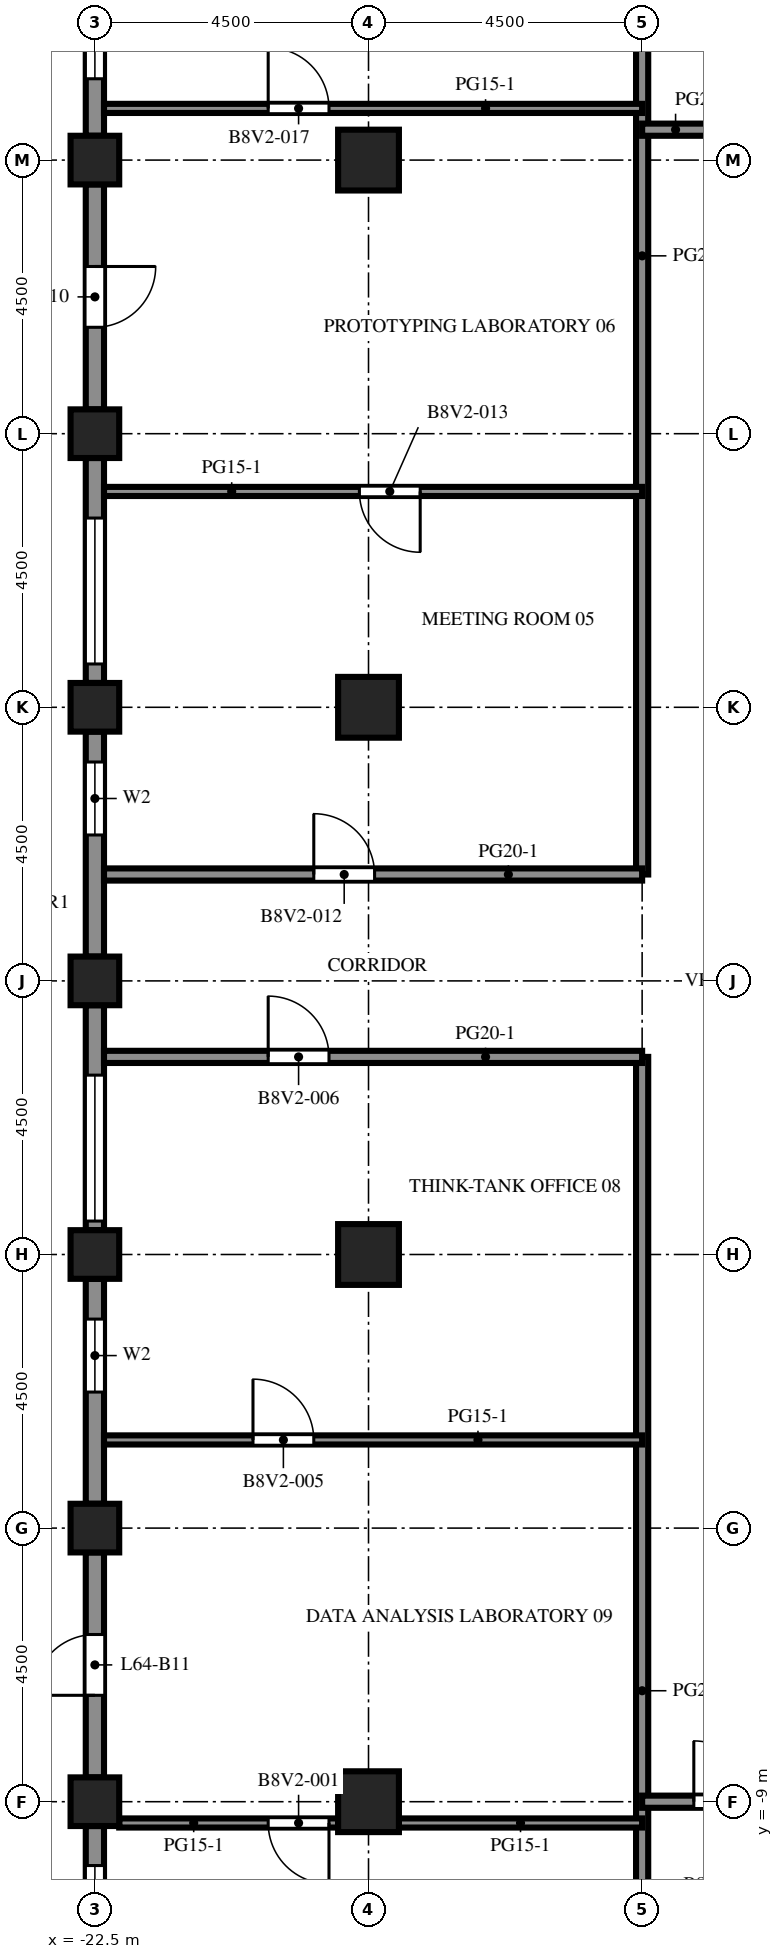
"""IFC4 building model, lengths in metres.
Left out: names, types, materials, properties, quantities, classifications, styles, units other than length and angle.
Written with IfcOpenShell. Run it as: python <this file> out.ifc"""

import sys

from ifc_helpers import new_model, si_unit, direction, frame, frame_2d, origin, origin_2d, place, context, subcontext, project, spatial, rectangle, extrude, element, fill, save


model = new_model("IFC4")
c1 = context("Model", 3, precision=1e-05, world=origin(), true_north=direction((0.0, 1.0)))
c2 = subcontext(c1, "Body", "Model", "MODEL_VIEW")
j1 = project(units=[si_unit("LENGTHUNIT", "METRE"), si_unit("PLANEANGLEUNIT", "RADIAN")], contexts=[c1])
p1 = place(None, origin())
s1 = spatial("IfcSite", under=j1, at=p1, CompositionType="ELEMENT")
p2 = place(p1, origin())
s2 = spatial("IfcBuilding", under=s1, at=p2, CompositionType="ELEMENT")
p3 = place(p2, frame((0.0, 0.0, 282.7)))
s3 = spatial("IfcBuildingStorey", under=s2, at=p3, CompositionType="ELEMENT", Elevation=282.7)
for number, where, z_axis, x_axis in (
    (1, (-22.5, -9.0, 0.0), (0.0, 0.0, 1.0), (1.0, 0.0, 0.0)),
    (2, (-22.5, -4.5, 0.0), (0.0, 0.0, 1.0), (1.0, 0.0, 0.0)),
    (3, (-22.5, 0.0, 0.0), (0.0, 0.0, 1.0), (1.0, 0.0, 0.0)),
    (4, (-22.5, 4.5, 0.0), (0.0, 0.0, 1.0), (1.0, 0.0, 0.0)),
    (5, (-22.5, 9.0, 0.0), (0.0, 0.0, 1.0), (1.0, 0.0, 0.0)),
    (6, (-22.5, 13.5, 0.0), (0.0, 0.0, 1.0), (1.0, 0.0, 0.0)),
    (7, (-22.5, 18.0, 0.0), (0.0, 0.0, 1.0), (1.0, 0.0, 0.0)),
):
    element("IfcColumn", number, at=place(p3, frame(where, z_axis=z_axis, x_axis=x_axis)), inside=s3, PredefinedType="COLUMN", context=c2, shape_type="SweptSolid", body=[
        extrude(rectangle(XDim=0.8, YDim=0.8, at=origin_2d()), origin(), (0.0, 0.0, 1.0), 4.1),
    ])
for number, where, z_axis, x_axis in (
    (8, (-18.0, -9.0, 0.0), (0.0, 0.0, 1.0), (1.0, 0.0, 0.0)),
    (9, (-18.0, 0.0, 0.0), (0.0, 0.0, 1.0), (1.0, 0.0, 0.0)),
    (10, (-18.0, 9.0, 0.0), (0.0, 0.0, 1.0), (1.0, 0.0, 0.0)),
    (11, (-18.0, 18.0, 0.0), (0.0, 0.0, 1.0), (1.0, 0.0, 0.0)),
):
    element("IfcColumn", number, at=place(p3, frame(where, z_axis=z_axis, x_axis=x_axis)), inside=s3, PredefinedType="COLUMN", context=c2, shape_type="SweptSolid", body=[
        extrude(rectangle(XDim=1.0, YDim=1.0, at=origin_2d()), origin(), (0.0, 0.0, 1.0), 4.1),
    ])
p4 = place(p3, frame((-22.5, 18.4, 0.0), z_axis=(0.0, 0.0, 1.0), x_axis=(0.0, 1.0, 0.0)))
e12 = element("IfcWall", 12, at=p4, inside=s3, PredefinedType="SOLIDWALL", context=c2, shape_type="SweptSolid", body=[
    extrude(rectangle(XDim=3.7, YDim=0.3, at=frame_2d((1.85, 0.0))), origin(), (0.0, 0.0, 1.0), 2.85),
])
p5 = place(p4, frame((0.938, 0.0, 0.8)))
e13 = element("IfcOpeningElement", 13, at=p5, cuts=e12, PredefinedType="OPENING", context=c2, shape_type="SweptSolid", body=[
    extrude(rectangle(XDim=2.4, YDim=1.7, at=frame_2d((1.2, 0.85))), frame((0.0, 0.16, 0.0), z_axis=(0.0, -1.0, 0.0), x_axis=(1.0, 0.0, 0.0)), (0.0, 0.0, 1.0), 0.32),
])
p6 = place(p3, frame((-22.5, 13.9, 0.0), z_axis=(0.0, 0.0, 1.0), x_axis=(0.0, 1.0, 0.0)))
e14 = element("IfcWall", 14, at=p6, inside=s3, PredefinedType="SOLIDWALL", context=c2, shape_type="SweptSolid", body=[
    extrude(rectangle(XDim=3.7, YDim=0.3, at=frame_2d((1.85, 0.0))), origin(), (0.0, 0.0, 1.0), 2.85),
])
p7 = place(p6, frame((1.35, 0.0, 0.0)))
e15 = element("IfcOpeningElement", 15, at=p7, cuts=e14, PredefinedType="OPENING", context=c2, shape_type="SweptSolid", body=[
    extrude(rectangle(XDim=1.0, YDim=2.2, at=frame_2d((0.5, 1.1))), frame((0.0, 0.16, 0.0), z_axis=(0.0, -1.0, 0.0), x_axis=(1.0, 0.0, 0.0)), (0.0, 0.0, 1.0), 0.32),
])
p8 = place(p3, frame((-22.5, 9.4, 0.0), z_axis=(0.0, 0.0, 1.0), x_axis=(0.0, 1.0, 0.0)))
e16 = element("IfcWall", 16, at=p8, inside=s3, PredefinedType="SOLIDWALL", context=c2, shape_type="SweptSolid", body=[
    extrude(rectangle(XDim=3.7, YDim=0.3, at=frame_2d((1.85, 0.0))), origin(), (0.0, 0.0, 1.0), 2.85),
])
p9 = place(p8, frame((0.312, 0.0, 0.8)))
e17 = element("IfcOpeningElement", 17, at=p9, cuts=e16, PredefinedType="OPENING", context=c2, shape_type="SweptSolid", body=[
    extrude(rectangle(XDim=2.4, YDim=1.7, at=frame_2d((1.2, 0.85))), frame((0.0, 0.16, 0.0), z_axis=(0.0, -1.0, 0.0), x_axis=(1.0, 0.0, 0.0)), (0.0, 0.0, 1.0), 0.32),
])
p10 = place(p3, frame((-22.5, 4.9, 0.0), z_axis=(0.0, 0.0, 1.0), x_axis=(0.0, 1.0, 0.0)))
e18 = element("IfcWall", 18, at=p10, inside=s3, PredefinedType="SOLIDWALL", context=c2, shape_type="SweptSolid", body=[
    extrude(rectangle(XDim=3.7, YDim=0.3, at=frame_2d((1.85, 0.0))), origin(), (0.0, 0.0, 1.0), 2.85),
])
p11 = place(p10, frame((2.0, 0.0, 0.8)))
e19 = element("IfcOpeningElement", 19, at=p11, cuts=e18, PredefinedType="OPENING", context=c2, shape_type="SweptSolid", body=[
    extrude(rectangle(XDim=1.2, YDim=1.7, at=frame_2d((0.6, 0.85))), frame((0.0, 0.16, 0.0), z_axis=(0.0, -1.0, 0.0), x_axis=(1.0, 0.0, 0.0)), (0.0, 0.0, 1.0), 0.32),
])
p12 = place(p3, frame((-22.5, 0.4, 0.0), z_axis=(0.0, 0.0, 1.0), x_axis=(0.0, 1.0, 0.0)))
e20 = element("IfcWall", 20, at=p12, inside=s3, PredefinedType="SOLIDWALL", context=c2, shape_type="SweptSolid", body=[
    extrude(rectangle(XDim=3.7, YDim=0.3, at=frame_2d((1.85, 0.0))), origin(), (0.0, 0.0, 1.0), 2.85),
])
p13 = place(p12, frame((0.15, 0.0, 0.8)))
e21 = element("IfcOpeningElement", 21, at=p13, cuts=e20, PredefinedType="OPENING", context=c2, shape_type="SweptSolid", body=[
    extrude(rectangle(XDim=2.4, YDim=1.7, at=frame_2d((1.2, 0.85))), frame((0.0, 0.16, 0.0), z_axis=(0.0, -1.0, 0.0), x_axis=(1.0, 0.0, 0.0)), (0.0, 0.0, 1.0), 0.32),
])
p14 = place(p3, frame((-22.5, -4.1, 0.0), z_axis=(0.0, 0.0, 1.0), x_axis=(0.0, 1.0, 0.0)))
e22 = element("IfcWall", 22, at=p14, inside=s3, PredefinedType="SOLIDWALL", context=c2, shape_type="SweptSolid", body=[
    extrude(rectangle(XDim=3.7, YDim=0.3, at=frame_2d((1.85, 0.0))), origin(), (0.0, 0.0, 1.0), 2.85),
])
p15 = place(p14, frame((1.837, 0.0, 0.8)))
e23 = element("IfcOpeningElement", 23, at=p15, cuts=e22, PredefinedType="OPENING", context=c2, shape_type="SweptSolid", body=[
    extrude(rectangle(XDim=1.2, YDim=1.7, at=frame_2d((0.6, 0.85))), frame((0.0, 0.16, 0.0), z_axis=(0.0, -1.0, 0.0), x_axis=(1.0, 0.0, 0.0)), (0.0, 0.0, 1.0), 0.32),
])
p16 = place(p3, frame((-22.5, -8.6, 0.0), z_axis=(0.0, 0.0, 1.0), x_axis=(0.0, 1.0, 0.0)))
e24 = element("IfcWall", 24, at=p16, inside=s3, PredefinedType="SOLIDWALL", context=c2, shape_type="SweptSolid", body=[
    extrude(rectangle(XDim=3.7, YDim=0.3, at=frame_2d((1.85, 0.0))), origin(), (0.0, 0.0, 1.0), 2.85),
])
p17 = place(p16, frame((1.35, 0.0, 0.0)))
e25 = element("IfcOpeningElement", 25, at=p17, cuts=e24, PredefinedType="OPENING", context=c2, shape_type="SweptSolid", body=[
    extrude(rectangle(XDim=1.0, YDim=2.2, at=frame_2d((0.5, 1.1))), frame((0.0, 0.16, 0.0), z_axis=(0.0, -1.0, 0.0), x_axis=(1.0, 0.0, 0.0)), (0.0, 0.0, 1.0), 0.32),
])
p18 = place(p3, frame((-22.5, -13.1, 0.0), z_axis=(0.0, 0.0, 1.0), x_axis=(0.0, 1.0, 0.0)))
e26 = element("IfcWall", 26, at=p18, inside=s3, PredefinedType="SOLIDWALL", context=c2, shape_type="SweptSolid", body=[
    extrude(rectangle(XDim=3.7, YDim=0.3, at=frame_2d((1.85, 0.0))), origin(), (0.0, 0.0, 1.0), 2.85),
])
p19 = place(p18, frame((0.65, 0.0, 0.8)))
e27 = element("IfcOpeningElement", 27, at=p19, cuts=e26, PredefinedType="OPENING", context=c2, shape_type="SweptSolid", body=[
    extrude(rectangle(XDim=2.4, YDim=1.7, at=frame_2d((1.2, 0.85))), frame((0.0, 0.16, 0.0), z_axis=(0.0, -1.0, 0.0), x_axis=(1.0, 0.0, 0.0)), (0.0, 0.0, 1.0), 0.32),
])
p20 = place(p3, frame((-13.5, -17.6, 0.0), z_axis=(0.0, 0.0, 1.0), x_axis=(0.0, 1.0, 0.0)))
e28 = element("IfcWall", 28, at=p20, inside=s3, PredefinedType="PARTITIONING", context=c2, shape_type="SweptSolid", body=[
    extrude(rectangle(XDim=20.85, YDim=0.2, at=frame_2d((10.425, 0.0))), origin(), (0.0, 0.0, 1.0), 3.65),
])
p21 = place(p3, frame((-13.5, 6.25, 0.0), z_axis=(0.0, 0.0, 1.0), x_axis=(0.0, 1.0, 0.0)))
e29 = element("IfcWall", 29, at=p21, inside=s3, PredefinedType="PARTITIONING", context=c2, shape_type="SweptSolid", body=[
    extrude(rectangle(XDim=20.35, YDim=0.2, at=frame_2d((10.175, 0.0))), origin(), (0.0, 0.0, 1.0), 3.65),
])
p22 = place(p3, frame((-18.5, -9.35, 0.0), z_axis=(0.0, 0.0, 1.0), x_axis=(-1.0, 0.0, 0.0)))
e30 = element("IfcWall", 30, at=p22, inside=s3, PredefinedType="PARTITIONING", context=c2, shape_type="SweptSolid", body=[
    extrude(rectangle(XDim=3.6, YDim=0.15, at=frame_2d((1.8, 0.0))), origin(), (0.0, 0.0, 1.0), 3.65),
])
p23 = place(p22, frame((0.15, 0.0, 0.0)))
e31 = element("IfcOpeningElement", 31, at=p23, cuts=e30, PredefinedType="OPENING", context=c2, shape_type="SweptSolid", body=[
    extrude(rectangle(XDim=1.0, YDim=2.1, at=frame_2d((0.5, 1.05))), frame((0.0, 0.085, 0.0), z_axis=(0.0, -1.0, 0.0), x_axis=(1.0, 0.0, 0.0)), (0.0, 0.0, 1.0), 0.17),
])
p24 = place(p3, frame((-17.5, -9.35, 0.0), z_axis=(0.0, 0.0, 1.0), x_axis=(1.0, 0.0, 0.0)))
e32 = element("IfcWall", 32, at=p24, inside=s3, PredefinedType="PARTITIONING", context=c2, shape_type="SweptSolid", body=[
    extrude(rectangle(XDim=4.0, YDim=0.15, at=frame_2d((2.0, 0.0))), origin(), (0.0, 0.0, 1.0), 3.65),
])
p25 = place(p3, frame((-10.5, -9.0, 0.0), z_axis=(0.0, 0.0, 1.0), x_axis=(-1.0, 0.0, 0.0)))
e33 = element("IfcWall", 33, at=p25, inside=s3, PredefinedType="PARTITIONING", context=c2, shape_type="SweptSolid", body=[
    extrude(rectangle(XDim=3.0, YDim=0.2, at=frame_2d((1.5, 0.0))), origin(), (0.0, 0.0, 1.0), 3.65),
])
p26 = place(p25, frame((1.15, 0.0, 0.0)))
e34 = element("IfcOpeningElement", 34, at=p26, cuts=e33, PredefinedType="OPENING", context=c2, shape_type="SweptSolid", body=[
    extrude(rectangle(XDim=1.0, YDim=2.1, at=frame_2d((0.5, 1.05))), frame((0.0, 0.11, 0.0), z_axis=(0.0, -1.0, 0.0), x_axis=(1.0, 0.0, 0.0)), (0.0, 0.0, 1.0), 0.22),
])
p27 = place(p3, frame((-13.5, -3.05, 0.0), z_axis=(0.0, 0.0, 1.0), x_axis=(-1.0, 0.0, 0.0)))
e35 = element("IfcWall", 35, at=p27, inside=s3, PredefinedType="PARTITIONING", context=c2, shape_type="SweptSolid", body=[
    extrude(rectangle(XDim=8.85, YDim=0.15, at=frame_2d((4.425, 0.0))), origin(), (0.0, 0.0, 1.0), 3.65),
])
p28 = place(p27, frame((5.4, 0.0, 0.0)))
e36 = element("IfcOpeningElement", 36, at=p28, cuts=e35, PredefinedType="OPENING", context=c2, shape_type="SweptSolid", body=[
    extrude(rectangle(XDim=1.0, YDim=2.1, at=frame_2d((0.5, 1.05))), frame((0.0, 0.085, 0.0), z_axis=(0.0, -1.0, 0.0), x_axis=(1.0, 0.0, 0.0)), (0.0, 0.0, 1.0), 0.17),
])
p29 = place(p3, frame((-13.5, 3.25, 0.0), z_axis=(0.0, 0.0, 1.0), x_axis=(-1.0, 0.0, 0.0)))
e37 = element("IfcWall", 37, at=p29, inside=s3, PredefinedType="PARTITIONING", context=c2, shape_type="SweptSolid", body=[
    extrude(rectangle(XDim=8.85, YDim=0.2, at=frame_2d((4.425, 0.0))), origin(), (0.0, 0.0, 1.0), 3.65),
])
p30 = place(p29, frame((5.15, 0.0, 0.0)))
e38 = element("IfcOpeningElement", 38, at=p30, cuts=e37, PredefinedType="OPENING", context=c2, shape_type="SweptSolid", body=[
    extrude(rectangle(XDim=1.0, YDim=2.1, at=frame_2d((0.5, 1.05))), frame((0.0, 0.11, 0.0), z_axis=(0.0, -1.0, 0.0), x_axis=(1.0, 0.0, 0.0)), (0.0, 0.0, 1.0), 0.22),
])
p31 = place(p3, frame((-22.35, 6.25, 0.0), z_axis=(0.0, 0.0, 1.0), x_axis=(1.0, 0.0, 0.0)))
e39 = element("IfcWall", 39, at=p31, inside=s3, PredefinedType="PARTITIONING", context=c2, shape_type="SweptSolid", body=[
    extrude(rectangle(XDim=8.85, YDim=0.2, at=frame_2d((4.425, 0.0))), origin(), (0.0, 0.0, 1.0), 3.65),
])
p32 = place(p31, frame((3.45, 0.0, 0.0)))
e40 = element("IfcOpeningElement", 40, at=p32, cuts=e39, PredefinedType="OPENING", context=c2, shape_type="SweptSolid", body=[
    extrude(rectangle(XDim=1.0, YDim=2.1, at=frame_2d((0.5, 1.05))), frame((0.0, 0.11, 0.0), z_axis=(0.0, -1.0, 0.0), x_axis=(1.0, 0.0, 0.0)), (0.0, 0.0, 1.0), 0.22),
])
p33 = place(p3, frame((-22.35, 12.55, 0.0), z_axis=(0.0, 0.0, 1.0), x_axis=(1.0, 0.0, 0.0)))
e41 = element("IfcWall", 41, at=p33, inside=s3, PredefinedType="PARTITIONING", context=c2, shape_type="SweptSolid", body=[
    extrude(rectangle(XDim=8.85, YDim=0.15, at=frame_2d((4.425, 0.0))), origin(), (0.0, 0.0, 1.0), 3.65),
])
p34 = place(p33, frame((4.2, 0.0, 0.0)))
e42 = element("IfcOpeningElement", 42, at=p34, cuts=e41, PredefinedType="OPENING", context=c2, shape_type="SweptSolid", body=[
    extrude(rectangle(XDim=1.0, YDim=2.1, at=frame_2d((0.5, 1.05))), frame((0.0, 0.085, 0.0), z_axis=(0.0, -1.0, 0.0), x_axis=(1.0, 0.0, 0.0)), (0.0, 0.0, 1.0), 0.17),
])
p35 = place(p3, frame((-13.5, 18.5, 0.0), z_axis=(0.0, 0.0, 1.0), x_axis=(1.0, 0.0, 0.0)))
e43 = element("IfcWall", 43, at=p35, inside=s3, PredefinedType="PARTITIONING", context=c2, shape_type="SweptSolid", body=[
    extrude(rectangle(XDim=3.0, YDim=0.2, at=frame_2d((1.5, 0.0))), origin(), (0.0, 0.0, 1.0), 3.65),
])
p36 = place(p35, frame((1.1, 0.0, 0.0)))
e44 = element("IfcOpeningElement", 44, at=p36, cuts=e43, PredefinedType="OPENING", context=c2, shape_type="SweptSolid", body=[
    extrude(rectangle(XDim=1.0, YDim=2.1, at=frame_2d((0.5, 1.05))), frame((0.0, 0.11, 0.0), z_axis=(0.0, -1.0, 0.0), x_axis=(1.0, 0.0, 0.0)), (0.0, 0.0, 1.0), 0.22),
])
p37 = place(p3, frame((-22.35, 18.85, 0.0), z_axis=(0.0, 0.0, 1.0), x_axis=(1.0, 0.0, 0.0)))
e45 = element("IfcWall", 45, at=p37, inside=s3, PredefinedType="PARTITIONING", context=c2, shape_type="SweptSolid", body=[
    extrude(rectangle(XDim=8.85, YDim=0.15, at=frame_2d((4.425, 0.0))), origin(), (0.0, 0.0, 1.0), 3.65),
])
p38 = place(p37, frame((2.7, 0.0, 0.0)))
e46 = element("IfcOpeningElement", 46, at=p38, cuts=e45, PredefinedType="OPENING", context=c2, shape_type="SweptSolid", body=[
    extrude(rectangle(XDim=1.0, YDim=2.1, at=frame_2d((0.5, 1.05))), frame((0.0, 0.085, 0.0), z_axis=(0.0, -1.0, 0.0), x_axis=(1.0, 0.0, 0.0)), (0.0, 0.0, 1.0), 0.17),
])
p39 = place(p5, origin())
e47 = element("IfcWindow", 47, at=p39, inside=s3, PartitioningType="SINGLE_PANEL", PredefinedType="WINDOW", context=c2, shape_type="SweptSolid", body=[
    extrude(rectangle(XDim=2.4, YDim=1.7, at=frame_2d((1.2, 0.85))), frame((0.0, 0.03, 0.0), z_axis=(0.0, -1.0, 0.0), x_axis=(1.0, 0.0, 0.0)), (0.0, 0.0, 1.0), 0.06),
])
fill(e13, e47)
p40 = place(p7, origin())
e48 = element("IfcDoor", 48, at=p40, inside=s3, OperationType="SINGLE_SWING_RIGHT", PredefinedType="DOOR", context=c2, shape_type="SweptSolid", body=[
    extrude(rectangle(XDim=1.0, YDim=2.2, at=frame_2d((0.5, 1.1))), frame((0.0, 0.025, 0.0), z_axis=(0.0, -1.0, 0.0), x_axis=(1.0, 0.0, 0.0)), (0.0, 0.0, 1.0), 0.05),
])
fill(e15, e48)
p41 = place(p9, origin())
e49 = element("IfcWindow", 49, at=p41, inside=s3, PartitioningType="SINGLE_PANEL", PredefinedType="WINDOW", context=c2, shape_type="SweptSolid", body=[
    extrude(rectangle(XDim=2.4, YDim=1.7, at=frame_2d((1.2, 0.85))), frame((0.0, 0.03, 0.0), z_axis=(0.0, -1.0, 0.0), x_axis=(1.0, 0.0, 0.0)), (0.0, 0.0, 1.0), 0.06),
])
fill(e17, e49)
p42 = place(p11, origin())
e50 = element("IfcWindow", 50, at=p42, inside=s3, PartitioningType="SINGLE_PANEL", PredefinedType="WINDOW", context=c2, shape_type="SweptSolid", body=[
    extrude(rectangle(XDim=1.2, YDim=1.7, at=frame_2d((0.6, 0.85))), frame((0.0, 0.03, 0.0), z_axis=(0.0, -1.0, 0.0), x_axis=(1.0, 0.0, 0.0)), (0.0, 0.0, 1.0), 0.06),
])
fill(e19, e50)
p43 = place(p13, origin())
e51 = element("IfcWindow", 51, at=p43, inside=s3, PartitioningType="SINGLE_PANEL", PredefinedType="WINDOW", context=c2, shape_type="SweptSolid", body=[
    extrude(rectangle(XDim=2.4, YDim=1.7, at=frame_2d((1.2, 0.85))), frame((0.0, 0.03, 0.0), z_axis=(0.0, -1.0, 0.0), x_axis=(1.0, 0.0, 0.0)), (0.0, 0.0, 1.0), 0.06),
])
fill(e21, e51)
p44 = place(p15, origin())
e52 = element("IfcWindow", 52, at=p44, inside=s3, PartitioningType="SINGLE_PANEL", PredefinedType="WINDOW", context=c2, shape_type="SweptSolid", body=[
    extrude(rectangle(XDim=1.2, YDim=1.7, at=frame_2d((0.6, 0.85))), frame((0.0, 0.03, 0.0), z_axis=(0.0, -1.0, 0.0), x_axis=(1.0, 0.0, 0.0)), (0.0, 0.0, 1.0), 0.06),
])
fill(e23, e52)
p45 = place(p17, origin())
e53 = element("IfcDoor", 53, at=p45, inside=s3, OperationType="SINGLE_SWING_LEFT", PredefinedType="DOOR", context=c2, shape_type="SweptSolid", body=[
    extrude(rectangle(XDim=1.0, YDim=2.2, at=frame_2d((0.5, 1.1))), frame((0.0, 0.025, 0.0), z_axis=(0.0, -1.0, 0.0), x_axis=(1.0, 0.0, 0.0)), (0.0, 0.0, 1.0), 0.05),
])
fill(e25, e53)
p46 = place(p19, origin())
e54 = element("IfcWindow", 54, at=p46, inside=s3, PartitioningType="SINGLE_PANEL", PredefinedType="WINDOW", context=c2, shape_type="SweptSolid", body=[
    extrude(rectangle(XDim=2.4, YDim=1.7, at=frame_2d((1.2, 0.85))), frame((0.0, 0.03, 0.0), z_axis=(0.0, -1.0, 0.0), x_axis=(1.0, 0.0, 0.0)), (0.0, 0.0, 1.0), 0.06),
])
fill(e27, e54)
p47 = place(p23, origin())
e55 = element("IfcDoor", 55, at=p47, inside=s3, OperationType="SINGLE_SWING_LEFT", PredefinedType="DOOR", context=c2, shape_type="SweptSolid", body=[
    extrude(rectangle(XDim=1.0, YDim=2.1, at=frame_2d((0.5, 1.05))), frame((0.0, 0.025, 0.0), z_axis=(0.0, -1.0, 0.0), x_axis=(1.0, 0.0, 0.0)), (0.0, 0.0, 1.0), 0.05),
])
fill(e31, e55)
p48 = place(p26, origin())
e56 = element("IfcDoor", 56, at=p48, inside=s3, OperationType="SINGLE_SWING_RIGHT", PredefinedType="DOOR", context=c2, shape_type="SweptSolid", body=[
    extrude(rectangle(XDim=1.0, YDim=2.1, at=frame_2d((0.5, 1.05))), frame((0.0, 0.025, 0.0), z_axis=(0.0, -1.0, 0.0), x_axis=(1.0, 0.0, 0.0)), (0.0, 0.0, 1.0), 0.05),
])
fill(e34, e56)
p49 = place(p28, origin())
e57 = element("IfcDoor", 57, at=p49, inside=s3, OperationType="SINGLE_SWING_RIGHT", PredefinedType="DOOR", context=c2, shape_type="SweptSolid", body=[
    extrude(rectangle(XDim=1.0, YDim=2.1, at=frame_2d((0.5, 1.05))), frame((0.0, 0.025, 0.0), z_axis=(0.0, -1.0, 0.0), x_axis=(1.0, 0.0, 0.0)), (0.0, 0.0, 1.0), 0.05),
])
fill(e36, e57)
p50 = place(p30, origin())
e58 = element("IfcDoor", 58, at=p50, inside=s3, OperationType="SINGLE_SWING_RIGHT", PredefinedType="DOOR", context=c2, shape_type="SweptSolid", body=[
    extrude(rectangle(XDim=1.0, YDim=2.1, at=frame_2d((0.5, 1.05))), frame((0.0, 0.025, 0.0), z_axis=(0.0, -1.0, 0.0), x_axis=(1.0, 0.0, 0.0)), (0.0, 0.0, 1.0), 0.05),
])
fill(e38, e58)
p51 = place(p32, origin())
e59 = element("IfcDoor", 59, at=p51, inside=s3, OperationType="SINGLE_SWING_LEFT", PredefinedType="DOOR", context=c2, shape_type="SweptSolid", body=[
    extrude(rectangle(XDim=1.0, YDim=2.1, at=frame_2d((0.5, 1.05))), frame((0.0, 0.025, 0.0), z_axis=(0.0, -1.0, 0.0), x_axis=(1.0, 0.0, 0.0)), (0.0, 0.0, 1.0), 0.05),
])
fill(e40, e59)
p52 = place(p34, origin())
e60 = element("IfcDoor", 60, at=p52, inside=s3, OperationType="SINGLE_SWING_RIGHT", PredefinedType="DOOR", context=c2, shape_type="SweptSolid", body=[
    extrude(rectangle(XDim=1.0, YDim=2.1, at=frame_2d((0.5, 1.05))), frame((0.0, 0.025, 0.0), z_axis=(0.0, -1.0, 0.0), x_axis=(1.0, 0.0, 0.0)), (0.0, 0.0, 1.0), 0.05),
])
fill(e42, e60)
p53 = place(p38, origin())
e61 = element("IfcDoor", 61, at=p53, inside=s3, OperationType="SINGLE_SWING_LEFT", PredefinedType="DOOR", context=c2, shape_type="SweptSolid", body=[
    extrude(rectangle(XDim=1.0, YDim=2.1, at=frame_2d((0.5, 1.05))), frame((0.0, 0.025, 0.0), z_axis=(0.0, -1.0, 0.0), x_axis=(1.0, 0.0, 0.0)), (0.0, 0.0, 1.0), 0.05),
])
fill(e46, e61)
save(model, sys.argv[1])
